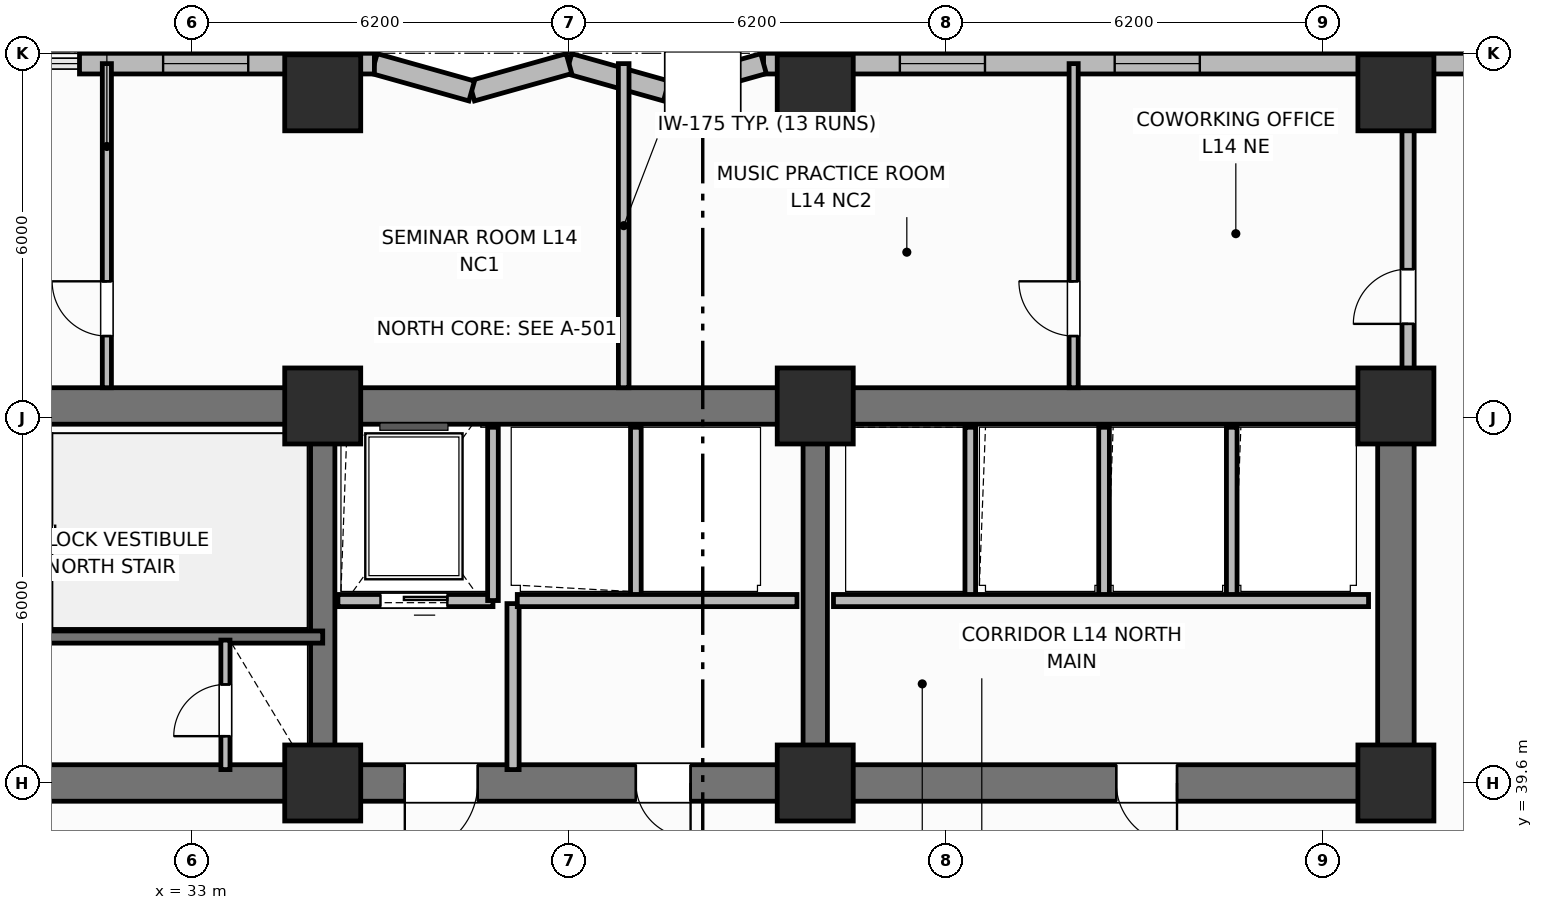
"""IFC4 building model, lengths in metres.
Left out: names, types, materials, properties, quantities, classifications, styles, units other than length and angle.
Written with IfcOpenShell. Run it as: python <this file> out.ifc"""

import sys

from ifc_helpers import new_model, si_unit, direction, frame, frame_2d, origin, origin_2d, place, context, subcontext, project, spatial, rectangle, extrude, element, fill, save


model = new_model("IFC4")
c1 = context("Model", 3, precision=1e-05, world=origin(), true_north=direction((0.0, 1.0)))
c2 = subcontext(c1, "Body", "Model", "MODEL_VIEW")
j1 = project(units=[si_unit("LENGTHUNIT", "METRE"), si_unit("PLANEANGLEUNIT", "RADIAN")], contexts=[c1])
p1 = place(None, origin())
s1 = spatial("IfcSite", under=j1, at=p1, CompositionType="ELEMENT")
p2 = place(p1, origin())
s2 = spatial("IfcBuilding", under=s1, at=p2, CompositionType="ELEMENT")
p3 = place(p2, frame((0.0, 0.0, 58.4)))
s3 = spatial("IfcBuildingStorey", under=s2, at=p3, CompositionType="ELEMENT", Elevation=58.4)
p4 = place(p3, frame((25.6, 45.8, 0.0), z_axis=(0.0, 0.0, 1.0), x_axis=(1.0, 0.0, 0.0)))
e1 = element("IfcWall", 1, at=p4, inside=s3, PredefinedType="SHEAR", context=c2, shape_type="SweptSolid", body=[
    extrude(rectangle(XDim=27.2, YDim=0.6, at=frame_2d((13.6, 0.0))), origin(), (0.0, 0.0, 1.0), 3.7),
])
p5 = place(p3, frame((52.8, 39.9, 0.0), z_axis=(0.0, 0.0, 1.0), x_axis=(0.0, 1.0, 0.0)))
e2 = element("IfcWall", 2, at=p5, inside=s3, PredefinedType="SHEAR", context=c2, shape_type="SweptSolid", body=[
    extrude(rectangle(XDim=5.6, YDim=0.6, at=frame_2d((2.8, 0.0))), origin(), (0.0, 0.0, 1.0), 3.7),
])
p6 = place(p3, frame((52.8, 39.6, 0.0), z_axis=(0.0, 0.0, 1.0), x_axis=(-1.0, 0.0, 0.0)))
e3 = element("IfcWall", 3, at=p6, inside=s3, PredefinedType="SHEAR", context=c2, shape_type="SweptSolid", body=[
    extrude(rectangle(XDim=27.2, YDim=0.6, at=frame_2d((13.6, 0.0))), origin(), (0.0, 0.0, 1.0), 3.7),
])
p7 = place(p6, frame((24.2, 0.0, 0.0)))
e4 = element("IfcOpeningElement", 4, at=p7, cuts=e3, PredefinedType="OPENING", context=c2, shape_type="SweptSolid", body=[
    extrude(rectangle(XDim=1.1, YDim=2.15, at=frame_2d((0.55, 1.075))), frame((0.0, 0.31, 0.0), z_axis=(0.0, -1.0, 0.0), x_axis=(1.0, 0.0, 0.0)), (0.0, 0.0, 1.0), 0.62),
])
p8 = place(p6, frame((15.1, 0.0, 0.0)))
e5 = element("IfcOpeningElement", 5, at=p8, cuts=e3, PredefinedType="OPENING", context=c2, shape_type="SweptSolid", body=[
    extrude(rectangle(XDim=1.2, YDim=2.15, at=frame_2d((0.6, 1.075))), frame((0.0, 0.31, 0.0), z_axis=(0.0, -1.0, 0.0), x_axis=(1.0, 0.0, 0.0)), (0.0, 0.0, 1.0), 0.62),
])
p9 = place(p6, frame((11.6, 0.0, 0.0)))
e6 = element("IfcOpeningElement", 6, at=p9, cuts=e3, PredefinedType="OPENING", context=c2, shape_type="SweptSolid", body=[
    extrude(rectangle(XDim=0.9, YDim=2.1, at=frame_2d((0.45, 1.05))), frame((0.0, 0.31, 0.0), z_axis=(0.0, -1.0, 0.0), x_axis=(1.0, 0.0, 0.0)), (0.0, 0.0, 1.0), 0.62),
])
p10 = place(p6, frame((3.6, 0.0, 0.0)))
e7 = element("IfcOpeningElement", 7, at=p10, cuts=e3, PredefinedType="OPENING", context=c2, shape_type="SweptSolid", body=[
    extrude(rectangle(XDim=1.0, YDim=2.15, at=frame_2d((0.5, 1.075))), frame((0.0, 0.31, 0.0), z_axis=(0.0, -1.0, 0.0), x_axis=(1.0, 0.0, 0.0)), (0.0, 0.0, 1.0), 0.62),
])
for number, where, z_axis, x_axis in (
    (8, (35.15, 39.9, 0.0), (0.0, 0.0, 1.0), (0.0, 1.0, 0.0)),
    (9, (43.25, 39.9, 0.0), (0.0, 0.0, 1.0), (0.0, 1.0, 0.0)),
):
    element("IfcWall", number, at=place(p3, frame(where, z_axis=z_axis, x_axis=x_axis)), inside=s3, PredefinedType="SHEAR", context=c2, shape_type="SweptSolid", body=[
        extrude(rectangle(XDim=5.6, YDim=0.4, at=frame_2d((2.8, 0.0))), origin(), (0.0, 0.0, 1.0), 3.7),
    ])
for number, where, z_axis, x_axis in (
    (10, (35.15, 39.6, 0.0), (0.0, 0.0, 1.0), (1.0, 0.0, 0.0)),
    (11, (35.15, 45.8, 0.0), (0.0, 0.0, 1.0), (1.0, 0.0, 0.0)),
    (12, (43.25, 39.6, 0.0), (0.0, 0.0, 1.0), (1.0, 0.0, 0.0)),
    (13, (43.25, 45.8, 0.0), (0.0, 0.0, 1.0), (1.0, 0.0, 0.0)),
    (14, (52.8, 39.6, 0.0), (0.0, 0.0, 1.0), (1.0, 0.0, 0.0)),
    (15, (52.8, 45.8, 0.0), (0.0, 0.0, 1.0), (1.0, 0.0, 0.0)),
    (16, (35.15, 50.95, 0.0), (0.0, 0.0, 1.0), (1.0, 0.0, 0.0)),
    (17, (43.25, 50.95, 0.0), (0.0, 0.0, 1.0), (1.0, 0.0, 0.0)),
    (18, (52.8, 50.95, 0.0), (0.0, 0.0, 1.0), (1.0, 0.0, 0.0)),
):
    element("IfcColumn", number, at=place(p3, frame(where, z_axis=z_axis, x_axis=x_axis)), inside=s3, PredefinedType="COLUMN", context=c2, shape_type="SweptSolid", body=[
        extrude(rectangle(XDim=1.25, YDim=1.25, at=origin_2d()), origin(), (0.0, 0.0, 1.0), 3.7),
    ])
p11 = place(p3, frame((55.35, 51.43, 0.0), z_axis=(0.0, 0.0, 1.0), x_axis=(-1.0, 0.0, 0.0)))
e19 = element("IfcWall", 19, at=p11, inside=s3, PredefinedType="SOLIDWALL", context=c2, shape_type="SweptSolid", body=[
    extrude(rectangle(XDim=12.95, YDim=0.34, at=frame_2d((6.475, 0.0))), origin(), (0.0, 0.0, 1.0), 2.7),
])
p12 = place(p11, frame((5.775, 0.0, 0.73)))
e20 = element("IfcOpeningElement", 20, at=p12, cuts=e19, PredefinedType="OPENING", context=c2, shape_type="SweptSolid", body=[
    extrude(rectangle(XDim=1.4, YDim=1.85, at=frame_2d((0.7, 0.925))), frame((0.0, 0.18, 0.0), z_axis=(0.0, -1.0, 0.0), x_axis=(1.0, 0.0, 0.0)), (0.0, 0.0, 1.0), 0.36),
])
p13 = place(p11, frame((9.308, 0.0, 0.73)))
e21 = element("IfcOpeningElement", 21, at=p13, cuts=e19, PredefinedType="OPENING", context=c2, shape_type="SweptSolid", body=[
    extrude(rectangle(XDim=1.4, YDim=1.85, at=frame_2d((0.7, 0.925))), frame((0.0, 0.18, 0.0), z_axis=(0.0, -1.0, 0.0), x_axis=(1.0, 0.0, 0.0)), (0.0, 0.0, 1.0), 0.36),
])
p14 = place(p3, frame((42.4, 51.43, 0.0), z_axis=(0.0, 0.0, 1.0), x_axis=(-0.962652136636, -0.270741322725, 0.0)))
e22 = element("IfcWall", 22, at=p14, inside=s3, PredefinedType="SOLIDWALL", context=c2, shape_type="SweptSolid", body=[
    extrude(rectangle(XDim=1.662, YDim=0.34, at=frame_2d((0.831, 0.0))), origin(), (0.0, 0.0, 1.0), 2.7),
])
p15 = place(p3, frame((40.8, 50.98, 0.0), z_axis=(0.0, 0.0, 1.0), x_axis=(-0.962662902433, 0.270703040766, 0.0)))
e23 = element("IfcWall", 23, at=p15, inside=s3, PredefinedType="SOLIDWALL", context=c2, shape_type="SweptSolid", body=[
    extrude(rectangle(XDim=1.662, YDim=0.34, at=frame_2d((0.831, 0.0))), origin(), (0.0, 0.0, 1.0), 2.7),
])
p16 = place(p3, frame((39.2, 51.43, 0.0), z_axis=(0.0, 0.0, 1.0), x_axis=(-0.962652136636, -0.270741322725, 0.0)))
e24 = element("IfcWall", 24, at=p16, inside=s3, PredefinedType="SOLIDWALL", context=c2, shape_type="SweptSolid", body=[
    extrude(rectangle(XDim=1.662, YDim=0.34, at=frame_2d((0.831, 0.0))), origin(), (0.0, 0.0, 1.0), 2.7),
])
p17 = place(p3, frame((37.6, 50.98, 0.0), z_axis=(0.0, 0.0, 1.0), x_axis=(-0.962662902433, 0.270703040766, 0.0)))
e25 = element("IfcWall", 25, at=p17, inside=s3, PredefinedType="SOLIDWALL", context=c2, shape_type="SweptSolid", body=[
    extrude(rectangle(XDim=1.662, YDim=0.34, at=frame_2d((0.831, 0.0))), origin(), (0.0, 0.0, 1.0), 2.7),
])
p18 = place(p3, frame((36.0, 51.43, 0.0), z_axis=(0.0, 0.0, 1.0), x_axis=(-1.0, 0.0, 0.0)))
e26 = element("IfcWall", 26, at=p18, inside=s3, PredefinedType="SOLIDWALL", context=c2, shape_type="SweptSolid", body=[
    extrude(rectangle(XDim=4.85, YDim=0.34, at=frame_2d((2.425, 0.0))), origin(), (0.0, 0.0, 1.0), 2.7),
])
p19 = place(p18, frame((2.075, 0.0, 0.73)))
e27 = element("IfcOpeningElement", 27, at=p19, cuts=e26, PredefinedType="OPENING", context=c2, shape_type="SweptSolid", body=[
    extrude(rectangle(XDim=1.4, YDim=1.85, at=frame_2d((0.7, 0.925))), frame((0.0, 0.18, 0.0), z_axis=(0.0, -1.0, 0.0), x_axis=(1.0, 0.0, 0.0)), (0.0, 0.0, 1.0), 0.36),
])
p20 = place(p3, frame((35.15, 42.0, 0.0), z_axis=(0.0, 0.0, 1.0), x_axis=(-1.0, 0.0, 0.0)))
e28 = element("IfcWall", 28, at=p20, inside=s3, PredefinedType="SHEAR", context=c2, shape_type="SweptSolid", body=[
    extrude(rectangle(XDim=9.55, YDim=0.2, at=frame_2d((4.775, 0.0))), origin(), (0.0, 0.0, 1.0), 3.7),
])
p21 = place(p20, frame((7.25, 0.0, 0.0)))
e29 = element("IfcOpeningElement", 29, at=p21, cuts=e28, PredefinedType="OPENING", context=c2, shape_type="SweptSolid", body=[
    extrude(rectangle(XDim=1.1, YDim=2.15, at=frame_2d((0.55, 1.075))), frame((0.0, 0.11, 0.0), z_axis=(0.0, -1.0, 0.0), x_axis=(1.0, 0.0, 0.0)), (0.0, 0.0, 1.0), 0.22),
])
p22 = place(p3, frame((33.55, 39.82, 0.0), z_axis=(0.0, 0.0, 1.0), x_axis=(0.0, 1.0, 0.0)))
e30 = element("IfcWall", 30, at=p22, inside=s3, PredefinedType="PARTITIONING", context=c2, shape_type="SweptSolid", body=[
    extrude(rectangle(XDim=2.13, YDim=0.15, at=frame_2d((1.065, 0.0))), origin(), (0.0, 0.0, 1.0), 2.53),
])
p23 = place(p22, frame((0.55, 0.0, 0.0)))
e31 = element("IfcOpeningElement", 31, at=p23, cuts=e30, PredefinedType="OPENING", context=c2, shape_type="SweptSolid", body=[
    extrude(rectangle(XDim=0.85, YDim=2.05, at=frame_2d((0.425, 1.025))), frame((0.0, 0.085, 0.0), z_axis=(0.0, -1.0, 0.0), x_axis=(1.0, 0.0, 0.0)), (0.0, 0.0, 1.0), 0.17),
])
p24 = place(p3, frame((37.95, 42.6, 0.0), z_axis=(0.0, 0.0, 1.0), x_axis=(-1.0, 0.0, 0.0)))
e32 = element("IfcWall", 32, at=p24, inside=s3, PredefinedType="PARTITIONING", context=c2, shape_type="SweptSolid", body=[
    extrude(rectangle(XDim=2.55, YDim=0.2, at=frame_2d((1.275, 0.0))), origin(), (0.0, 0.0, 1.0), 2.3),
])
p25 = place(p24, frame((0.75, 0.0, 0.0)))
e33 = element("IfcOpeningElement", 33, at=p25, cuts=e32, PredefinedType="OPENING", context=c2, shape_type="SweptSolid", body=[
    extrude(rectangle(XDim=1.1, YDim=2.15, at=frame_2d((0.55, 1.075))), frame((0.0, 0.11, 0.0), z_axis=(0.0, -1.0, 0.0), x_axis=(1.0, 0.0, 0.0)), (0.0, 0.0, 1.0), 0.22),
])
p26 = place(p3, frame((37.95, 42.6, 0.0), z_axis=(0.0, 0.0, 1.0), x_axis=(0.0, 1.0, 0.0)))
e34 = element("IfcWall", 34, at=p26, inside=s3, PredefinedType="PARTITIONING", context=c2, shape_type="SweptSolid", body=[
    extrude(rectangle(XDim=2.85, YDim=0.175, at=frame_2d((1.425, 0.0))), origin(), (0.0, 0.0, 1.0), 2.53),
])
p27 = place(p3, frame((38.28, 39.82, 0.0), z_axis=(0.0, 0.0, 1.0), x_axis=(0.0, 1.0, 0.0)))
e35 = element("IfcWall", 35, at=p27, inside=s3, PredefinedType="PARTITIONING", context=c2, shape_type="SweptSolid", body=[
    extrude(rectangle(XDim=2.73, YDim=0.2, at=frame_2d((1.365, 0.0))), origin(), (0.0, 0.0, 1.0), 2.53),
])
p28 = place(p3, frame((40.3, 42.65, 0.0), z_axis=(0.0, 0.0, 1.0), x_axis=(0.0, 1.0, 0.0)))
e36 = element("IfcWall", 36, at=p28, inside=s3, PredefinedType="PARTITIONING", context=c2, shape_type="SweptSolid", body=[
    extrude(rectangle(XDim=2.8, YDim=0.175, at=frame_2d((1.4, 0.0))), origin(), (0.0, 0.0, 1.0), 2.53),
])
p29 = place(p3, frame((42.95, 42.6, 0.0), z_axis=(0.0, 0.0, 1.0), x_axis=(-1.0, 0.0, 0.0)))
e37 = element("IfcWall", 37, at=p29, inside=s3, PredefinedType="PARTITIONING", context=c2, shape_type="SweptSolid", body=[
    extrude(rectangle(XDim=4.6, YDim=0.2, at=frame_2d((2.3, 0.0))), origin(), (0.0, 0.0, 1.0), 2.3),
])
for number, where, z_axis, x_axis in (
    (38, (45.8, 42.65, 0.0), (0.0, 0.0, 1.0), (0.0, 1.0, 0.0)),
    (39, (48.0, 42.65, 0.0), (0.0, 0.0, 1.0), (0.0, 1.0, 0.0)),
    (40, (50.1, 42.65, 0.0), (0.0, 0.0, 1.0), (0.0, 1.0, 0.0)),
):
    element("IfcWall", number, at=place(p3, frame(where, z_axis=z_axis, x_axis=x_axis)), inside=s3, PredefinedType="PARTITIONING", context=c2, shape_type="SweptSolid", body=[
        extrude(rectangle(XDim=2.8, YDim=0.175, at=frame_2d((1.4, 0.0))), origin(), (0.0, 0.0, 1.0), 2.53),
    ])
p30 = place(p3, frame((52.35, 42.6, 0.0), z_axis=(0.0, 0.0, 1.0), x_axis=(-1.0, 0.0, 0.0)))
e41 = element("IfcWall", 41, at=p30, inside=s3, PredefinedType="PARTITIONING", context=c2, shape_type="SweptSolid", body=[
    extrude(rectangle(XDim=8.8, YDim=0.2, at=frame_2d((4.4, 0.0))), origin(), (0.0, 0.0, 1.0), 2.53),
])
p31 = place(p3, frame((31.6, 46.1, 0.0), z_axis=(0.0, 0.0, 1.0), x_axis=(0.0, 1.0, 0.0)))
e42 = element("IfcWall", 42, at=p31, inside=s3, PredefinedType="PARTITIONING", context=c2, shape_type="SweptSolid", body=[
    extrude(rectangle(XDim=5.33, YDim=0.15, at=frame_2d((2.665, 0.0))), origin(), (0.0, 0.0, 1.0), 2.53),
])
p32 = place(p31, frame((0.85, 0.0, 0.0)))
e43 = element("IfcOpeningElement", 43, at=p32, cuts=e42, PredefinedType="OPENING", context=c2, shape_type="SweptSolid", body=[
    extrude(rectangle(XDim=0.9, YDim=2.1, at=frame_2d((0.45, 1.05))), frame((0.0, 0.085, 0.0), z_axis=(0.0, -1.0, 0.0), x_axis=(1.0, 0.0, 0.0)), (0.0, 0.0, 1.0), 0.17),
])
p33 = place(p3, frame((40.1, 46.1, 0.0), z_axis=(0.0, 0.0, 1.0), x_axis=(0.0, 1.0, 0.0)))
e44 = element("IfcWall", 44, at=p33, inside=s3, PredefinedType="PARTITIONING", context=c2, shape_type="SweptSolid", body=[
    extrude(rectangle(XDim=5.33, YDim=0.175, at=frame_2d((2.665, 0.0))), origin(), (0.0, 0.0, 1.0), 2.53),
])
p34 = place(p3, frame((47.5, 46.1, 0.0), z_axis=(0.0, 0.0, 1.0), x_axis=(0.0, 1.0, 0.0)))
e45 = element("IfcWall", 45, at=p34, inside=s3, PredefinedType="PARTITIONING", context=c2, shape_type="SweptSolid", body=[
    extrude(rectangle(XDim=5.33, YDim=0.15, at=frame_2d((2.665, 0.0))), origin(), (0.0, 0.0, 1.0), 2.53),
])
p35 = place(p34, frame((0.85, 0.0, 0.0)))
e46 = element("IfcOpeningElement", 46, at=p35, cuts=e45, PredefinedType="OPENING", context=c2, shape_type="SweptSolid", body=[
    extrude(rectangle(XDim=0.9, YDim=2.1, at=frame_2d((0.45, 1.05))), frame((0.0, 0.085, 0.0), z_axis=(0.0, -1.0, 0.0), x_axis=(1.0, 0.0, 0.0)), (0.0, 0.0, 1.0), 0.17),
])
p36 = place(p3, frame((53.0, 46.1, 0.0), z_axis=(0.0, 0.0, 1.0), x_axis=(0.0, 1.0, 0.0)))
e47 = element("IfcWall", 47, at=p36, inside=s3, PredefinedType="PARTITIONING", context=c2, shape_type="SweptSolid", body=[
    extrude(rectangle(XDim=4.58, YDim=0.2, at=frame_2d((2.29, 0.0))), origin(), (0.0, 0.0, 1.0), 2.53),
])
p37 = place(p36, frame((1.05, 0.0, 0.0)))
e48 = element("IfcOpeningElement", 48, at=p37, cuts=e47, PredefinedType="OPENING", context=c2, shape_type="SweptSolid", body=[
    extrude(rectangle(XDim=0.9, YDim=2.1, at=frame_2d((0.45, 1.05))), frame((0.0, 0.11, 0.0), z_axis=(0.0, -1.0, 0.0), x_axis=(1.0, 0.0, 0.0)), (0.0, 0.0, 1.0), 0.22),
])
p38 = place(p12, origin())
e49 = element("IfcWindow", 49, at=p38, inside=s3, PartitioningType="SINGLE_PANEL", PredefinedType="WINDOW", context=c2, shape_type="SweptSolid", body=[
    extrude(rectangle(XDim=1.4, YDim=1.85, at=frame_2d((0.7, 0.925))), frame((0.0, 0.03, 0.0), z_axis=(0.0, -1.0, 0.0), x_axis=(1.0, 0.0, 0.0)), (0.0, 0.0, 1.0), 0.06),
])
fill(e20, e49)
p39 = place(p13, origin())
e50 = element("IfcWindow", 50, at=p39, inside=s3, PartitioningType="SINGLE_PANEL", PredefinedType="WINDOW", context=c2, shape_type="SweptSolid", body=[
    extrude(rectangle(XDim=1.4, YDim=1.85, at=frame_2d((0.7, 0.925))), frame((0.0, 0.03, 0.0), z_axis=(0.0, -1.0, 0.0), x_axis=(1.0, 0.0, 0.0)), (0.0, 0.0, 1.0), 0.06),
])
fill(e21, e50)
p40 = place(p19, origin())
e51 = element("IfcWindow", 51, at=p40, inside=s3, PartitioningType="SINGLE_PANEL", PredefinedType="WINDOW", context=c2, shape_type="SweptSolid", body=[
    extrude(rectangle(XDim=1.4, YDim=1.85, at=frame_2d((0.7, 0.925))), frame((0.0, 0.03, 0.0), z_axis=(0.0, -1.0, 0.0), x_axis=(1.0, 0.0, 0.0)), (0.0, 0.0, 1.0), 0.06),
])
fill(e27, e51)
p41 = place(p23, origin())
e52 = element("IfcDoor", 52, at=p41, inside=s3, OperationType="SINGLE_SWING_LEFT", PredefinedType="TRAPDOOR", context=c2, shape_type="SweptSolid", body=[
    extrude(rectangle(XDim=0.85, YDim=2.05, at=frame_2d((0.425, 1.025))), frame((0.0, 0.025, 0.0), z_axis=(0.0, -1.0, 0.0), x_axis=(1.0, 0.0, 0.0)), (0.0, 0.0, 1.0), 0.05),
])
fill(e31, e52)
p42 = place(p25, origin())
e53 = element("IfcDoor", 53, at=p42, inside=s3, OperationType="SLIDING_TO_LEFT", PredefinedType="DOOR", context=c2, shape_type="SweptSolid", body=[
    extrude(rectangle(XDim=1.1, YDim=2.15, at=frame_2d((0.55, 1.075))), frame((0.0, 0.025, 0.0), z_axis=(0.0, -1.0, 0.0), x_axis=(1.0, 0.0, 0.0)), (0.0, 0.0, 1.0), 0.05),
])
fill(e33, e53)
p43 = place(p32, origin())
e54 = element("IfcDoor", 54, at=p43, inside=s3, OperationType="SINGLE_SWING_RIGHT", PredefinedType="DOOR", context=c2, shape_type="SweptSolid", body=[
    extrude(rectangle(XDim=0.9, YDim=2.1, at=frame_2d((0.45, 1.05))), frame((0.0, 0.025, 0.0), z_axis=(0.0, -1.0, 0.0), x_axis=(1.0, 0.0, 0.0)), (0.0, 0.0, 1.0), 0.05),
])
fill(e43, e54)
p44 = place(p35, origin())
e55 = element("IfcDoor", 55, at=p44, inside=s3, OperationType="SINGLE_SWING_RIGHT", PredefinedType="DOOR", context=c2, shape_type="SweptSolid", body=[
    extrude(rectangle(XDim=0.9, YDim=2.1, at=frame_2d((0.45, 1.05))), frame((0.0, 0.025, 0.0), z_axis=(0.0, -1.0, 0.0), x_axis=(1.0, 0.0, 0.0)), (0.0, 0.0, 1.0), 0.05),
])
fill(e46, e55)
p45 = place(p37, origin())
e56 = element("IfcDoor", 56, at=p45, inside=s3, OperationType="SINGLE_SWING_LEFT", PredefinedType="DOOR", context=c2, shape_type="SweptSolid", body=[
    extrude(rectangle(XDim=0.9, YDim=2.1, at=frame_2d((0.45, 1.05))), frame((0.0, 0.025, 0.0), z_axis=(0.0, -1.0, 0.0), x_axis=(1.0, 0.0, 0.0)), (0.0, 0.0, 1.0), 0.05),
])
fill(e48, e56)
p46 = place(p8, origin())
e57 = element("IfcDoor", 57, at=p46, inside=s3, OperationType="SINGLE_SWING_RIGHT", PredefinedType="DOOR", context=c2, shape_type="SweptSolid", body=[
    extrude(rectangle(XDim=1.2, YDim=2.15, at=frame_2d((0.6, 1.075))), frame((0.0, 0.025, 0.0), z_axis=(0.0, -1.0, 0.0), x_axis=(1.0, 0.0, 0.0)), (0.0, 0.0, 1.0), 0.05),
])
fill(e5, e57)
p47 = place(p9, origin())
e58 = element("IfcDoor", 58, at=p47, inside=s3, OperationType="SINGLE_SWING_LEFT", PredefinedType="DOOR", context=c2, shape_type="SweptSolid", body=[
    extrude(rectangle(XDim=0.9, YDim=2.1, at=frame_2d((0.45, 1.05))), frame((0.0, 0.025, 0.0), z_axis=(0.0, -1.0, 0.0), x_axis=(1.0, 0.0, 0.0)), (0.0, 0.0, 1.0), 0.05),
])
fill(e6, e58)
p48 = place(p10, origin())
e59 = element("IfcDoor", 59, at=p48, inside=s3, OperationType="SINGLE_SWING_LEFT", PredefinedType="DOOR", context=c2, shape_type="SweptSolid", body=[
    extrude(rectangle(XDim=1.0, YDim=2.15, at=frame_2d((0.5, 1.075))), frame((0.0, 0.025, 0.0), z_axis=(0.0, -1.0, 0.0), x_axis=(1.0, 0.0, 0.0)), (0.0, 0.0, 1.0), 0.05),
])
fill(e7, e59)
save(model, sys.argv[1])
